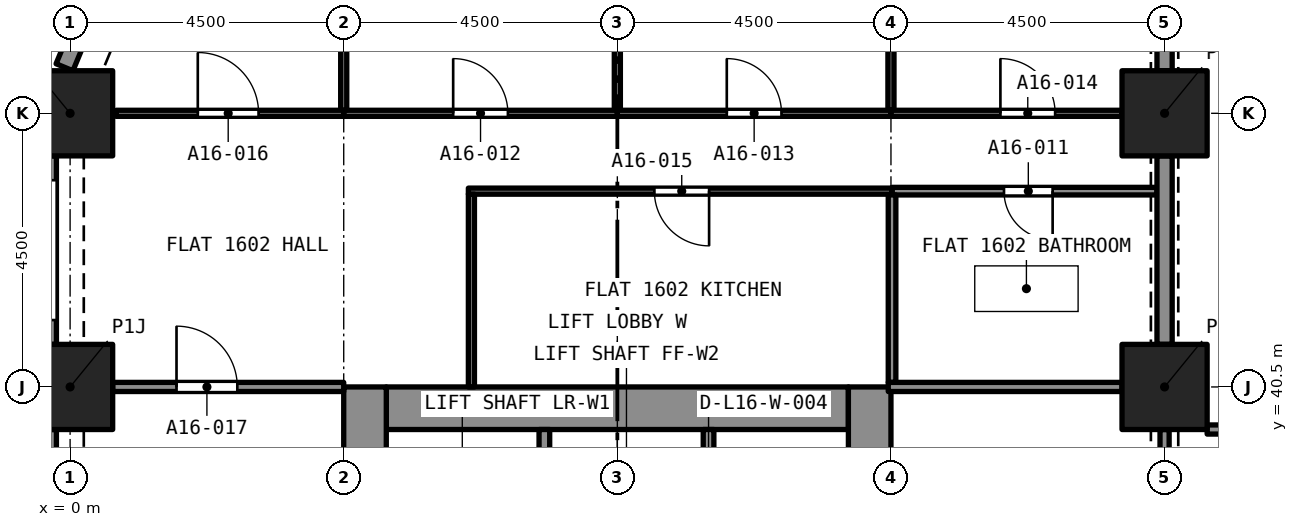
"""IFC4 building model, lengths in metres.
Left out: names, types, materials, properties, quantities, classifications, styles, units other than length and angle.
Written with IfcOpenShell. Run it as: python <this file> out.ifc"""

import sys

from ifc_helpers import new_model, si_unit, direction, frame, frame_2d, origin, origin_2d, place, context, subcontext, project, spatial, rectangle, extrude, element, fill, save


model = new_model("IFC4")
c1 = context("Model", 3, precision=1e-05, world=origin(), true_north=direction((0.0, 1.0)))
c2 = subcontext(c1, "Body", "Model", "MODEL_VIEW")
j1 = project(units=[si_unit("LENGTHUNIT", "METRE"), si_unit("PLANEANGLEUNIT", "RADIAN")], contexts=[c1])
p1 = place(None, origin())
s1 = spatial("IfcSite", under=j1, at=p1, CompositionType="ELEMENT")
p2 = place(p1, origin())
s2 = spatial("IfcBuilding", under=s1, at=p2, CompositionType="ELEMENT")
p3 = place(p2, frame((0.0, 0.0, 62.4)))
s3 = spatial("IfcBuildingStorey", under=s2, at=p3, CompositionType="ELEMENT", Elevation=62.4)
for number, where, z_axis, x_axis in (
    (1, (0.0, 40.5, 0.0), (0.0, 0.0, 1.0), (1.0, 0.0, 0.0)),
    (2, (18.0, 40.5, 0.0), (0.0, 0.0, 1.0), (1.0, 0.0, 0.0)),
    (3, (0.0, 45.0, 0.0), (0.0, 0.0, 1.0), (1.0, 0.0, 0.0)),
    (4, (18.0, 45.0, 0.0), (0.0, 0.0, 1.0), (1.0, 0.0, 0.0)),
):
    element("IfcColumn", number, at=place(p3, frame(where, z_axis=z_axis, x_axis=x_axis)), inside=s3, PredefinedType="COLUMN", context=c2, shape_type="SweptSolid", body=[
        extrude(rectangle(XDim=1.4, YDim=1.4, at=origin_2d()), origin(), (0.0, 0.0, 1.0), 3.2),
    ])
p4 = place(p3, frame((5.2, 40.15, 0.0), z_axis=(0.0, 0.0, 1.0), x_axis=(1.0, 0.0, 0.0)))
e5 = element("IfcWall", 5, at=p4, inside=s3, PredefinedType="SOLIDWALL", context=c2, shape_type="SweptSolid", body=[
    extrude(rectangle(XDim=7.6, YDim=0.7, at=frame_2d((3.8, 0.0))), origin(), (0.0, 0.0, 1.0), 3.2),
])
p5 = place(p3, frame((4.85, 27.0, 0.0), z_axis=(0.0, 0.0, 1.0), x_axis=(0.0, 1.0, 0.0)))
e6 = element("IfcWall", 6, at=p5, inside=s3, PredefinedType="SOLIDWALL", context=c2, shape_type="SweptSolid", body=[
    extrude(rectangle(XDim=13.5, YDim=0.7, at=frame_2d((6.75, 0.0))), origin(), (0.0, 0.0, 1.0), 3.2),
])
p6 = place(p5, frame((8.95, 0.0, 0.0)))
e7 = element("IfcOpeningElement", 7, at=p6, cuts=e6, PredefinedType="OPENING", context=c2, shape_type="SweptSolid", body=[
    extrude(rectangle(XDim=1.2, YDim=2.1, at=frame_2d((0.6, 1.05))), frame((0.0, 0.36, 0.0), z_axis=(0.0, -1.0, 0.0), x_axis=(1.0, 0.0, 0.0)), (0.0, 0.0, 1.0), 0.72),
])
p7 = place(p3, frame((13.15, 27.0, 0.0), z_axis=(0.0, 0.0, 1.0), x_axis=(0.0, 1.0, 0.0)))
e8 = element("IfcWall", 8, at=p7, inside=s3, PredefinedType="SOLIDWALL", context=c2, shape_type="SweptSolid", body=[
    extrude(rectangle(XDim=13.5, YDim=0.7, at=frame_2d((6.75, 0.0))), origin(), (0.0, 0.0, 1.0), 3.2),
])
p8 = place(p7, frame((11.1, 0.0, 0.0)))
e9 = element("IfcOpeningElement", 9, at=p8, cuts=e8, PredefinedType="OPENING", context=c2, shape_type="SweptSolid", body=[
    extrude(rectangle(XDim=1.1, YDim=2.1, at=frame_2d((0.55, 1.05))), frame((0.0, 0.36, 0.0), z_axis=(0.0, -1.0, 0.0), x_axis=(1.0, 0.0, 0.0)), (0.0, 0.0, 1.0), 0.72),
])
p9 = place(p7, frame((8.95, 0.0, 0.0)))
e10 = element("IfcOpeningElement", 10, at=p9, cuts=e8, PredefinedType="OPENING", context=c2, shape_type="SweptSolid", body=[
    extrude(rectangle(XDim=1.2, YDim=2.1, at=frame_2d((0.6, 1.05))), frame((0.0, 0.36, 0.0), z_axis=(0.0, -1.0, 0.0), x_axis=(1.0, 0.0, 0.0)), (0.0, 0.0, 1.0), 0.72),
])
p10 = place(p3, frame((-0.092, 45.757, 0.0), z_axis=(0.0, 0.0, 1.0), x_axis=(0.382737135771, 0.923857286003, 0.0)))
e11 = element("IfcWall", 11, at=p10, inside=s3, PredefinedType="SOLIDWALL", context=c2, shape_type="SweptSolid", body=[
    extrude(rectangle(XDim=1.865, YDim=0.3, at=frame_2d((0.933, 0.0))), origin(), (0.0, 0.0, 1.0), 3.2),
])
p11 = place(p10, frame((0.508, 0.0, 0.45)))
e12 = element("IfcOpeningElement", 12, at=p11, cuts=e11, PredefinedType="OPENING", context=c2, shape_type="SweptSolid", body=[
    extrude(rectangle(XDim=1.1, YDim=1.95, at=frame_2d((0.55, 0.975))), frame((0.0, 0.16, 0.0), z_axis=(0.0, -1.0, 0.0), x_axis=(1.0, 0.0, 0.0)), (0.0, 0.0, 1.0), 0.32),
])
p12 = place(p3, frame((-0.375, 41.2, 0.0), z_axis=(0.0, 0.0, 1.0), x_axis=(0.0, 1.0, 0.0)))
e13 = element("IfcWall", 13, at=p12, inside=s3, PredefinedType="SOLIDWALL", context=c2, shape_type="SweptSolid", body=[
    extrude(rectangle(XDim=3.1, YDim=0.3, at=frame_2d((1.55, 0.0))), origin(), (0.0, 0.0, 1.0), 3.2),
])
p13 = place(p12, frame((0.4, 0.0, 0.45)))
e14 = element("IfcOpeningElement", 14, at=p13, cuts=e13, PredefinedType="OPENING", context=c2, shape_type="SweptSolid", body=[
    extrude(rectangle(XDim=2.3, YDim=1.95, at=frame_2d((1.15, 0.975))), frame((0.0, 0.16, 0.0), z_axis=(0.0, -1.0, 0.0), x_axis=(1.0, 0.0, 0.0)), (0.0, 0.0, 1.0), 0.32),
])
p14 = place(p3, frame((-0.375, 36.7, 0.0), z_axis=(0.0, 0.0, 1.0), x_axis=(0.0, 1.0, 0.0)))
e15 = element("IfcWall", 15, at=p14, inside=s3, PredefinedType="SOLIDWALL", context=c2, shape_type="SweptSolid", body=[
    extrude(rectangle(XDim=3.1, YDim=0.3, at=frame_2d((1.55, 0.0))), origin(), (0.0, 0.0, 1.0), 3.2),
])
p15 = place(p14, frame((0.4, 0.0, 0.45)))
e16 = element("IfcOpeningElement", 16, at=p15, cuts=e15, PredefinedType="OPENING", context=c2, shape_type="SweptSolid", body=[
    extrude(rectangle(XDim=2.3, YDim=1.95, at=frame_2d((1.15, 0.975))), frame((0.0, 0.16, 0.0), z_axis=(0.0, -1.0, 0.0), x_axis=(1.0, 0.0, 0.0)), (0.0, 0.0, 1.0), 0.32),
])
p16 = place(p3, frame((17.875, 43.72, 0.0), z_axis=(0.0, 0.0, 1.0), x_axis=(-1.0, 0.0, 0.0)))
e17 = element("IfcWall", 17, at=p16, inside=s3, PredefinedType="PARTITIONING", context=c2, shape_type="SweptSolid", body=[
    extrude(rectangle(XDim=4.357, YDim=0.125, at=frame_2d((2.178, 0.0))), origin(), (0.0, 0.0, 1.0), 2.9),
])
p17 = place(p16, frame((1.716, 0.0, 0.0)))
e18 = element("IfcOpeningElement", 18, at=p17, cuts=e17, PredefinedType="OPENING", context=c2, shape_type="SweptSolid", body=[
    extrude(rectangle(XDim=0.8, YDim=2.1, at=frame_2d((0.4, 1.05))), frame((0.0, 0.073, 0.0), z_axis=(0.0, -1.0, 0.0), x_axis=(1.0, 0.0, 0.0)), (0.0, 0.0, 1.0), 0.145),
])
p18 = place(p3, frame((13.518, 40.575, 0.0), z_axis=(0.0, 0.0, 1.0), x_axis=(0.0, 1.0, 0.0)))
e19 = element("IfcWall", 19, at=p18, inside=s3, PredefinedType="PARTITIONING", context=c2, shape_type="SweptSolid", body=[
    extrude(rectangle(XDim=3.083, YDim=0.125, at=frame_2d((1.541, 0.0))), origin(), (0.0, 0.0, 1.0), 2.9),
])
p19 = place(p3, frame((18.0, 41.2, 0.0), z_axis=(0.0, 0.0, 1.0), x_axis=(0.0, 1.0, 0.0)))
e20 = element("IfcWall", 20, at=p19, inside=s3, PredefinedType="PARTITIONING", context=c2, shape_type="SweptSolid", body=[
    extrude(rectangle(XDim=3.1, YDim=0.25, at=frame_2d((1.55, 0.0))), origin(), (0.0, 0.0, 1.0), 2.38),
])
p20 = place(p3, frame((13.456, 40.5, 0.0), z_axis=(0.0, 0.0, 1.0), x_axis=(1.0, 0.0, 0.0)))
e21 = element("IfcWall", 21, at=p20, inside=s3, PredefinedType="PARTITIONING", context=c2, shape_type="SweptSolid", body=[
    extrude(rectangle(XDim=3.844, YDim=0.15, at=frame_2d((1.922, 0.0))), origin(), (0.0, 0.0, 1.0), 2.9),
])
p21 = place(p3, frame((9.0, 45.05, 0.0), z_axis=(0.0, 0.0, 1.0), x_axis=(0.0, 1.0, 0.0)))
e22 = element("IfcWall", 22, at=p21, inside=s3, PredefinedType="PARTITIONING", context=c2, shape_type="SweptSolid", body=[
    extrude(rectangle(XDim=3.75, YDim=0.1, at=frame_2d((1.875, 0.0))), origin(), (0.0, 0.0, 1.0), 2.9),
])
p22 = place(p3, frame((4.5, 45.0, 0.0), z_axis=(0.0, 0.0, 1.0), x_axis=(1.0, 0.0, 0.0)))
e23 = element("IfcWall", 23, at=p22, inside=s3, PredefinedType="PARTITIONING", context=c2, shape_type="SweptSolid", body=[
    extrude(rectangle(XDim=4.5, YDim=0.1, at=frame_2d((2.25, 0.0))), origin(), (0.0, 0.0, 1.0), 2.9),
])
p23 = place(p22, frame((1.8, 0.0, 0.0)))
e24 = element("IfcOpeningElement", 24, at=p23, cuts=e23, PredefinedType="OPENING", context=c2, shape_type="SweptSolid", body=[
    extrude(rectangle(XDim=0.9, YDim=2.1, at=frame_2d((0.45, 1.05))), frame((0.0, 0.06, 0.0), z_axis=(0.0, -1.0, 0.0), x_axis=(1.0, 0.0, 0.0)), (0.0, 0.0, 1.0), 0.12),
])
p24 = place(p3, frame((4.5, 45.05, 0.0), z_axis=(0.0, 0.0, 1.0), x_axis=(0.0, 1.0, 0.0)))
e25 = element("IfcWall", 25, at=p24, inside=s3, PredefinedType="PARTITIONING", context=c2, shape_type="SweptSolid", body=[
    extrude(rectangle(XDim=3.692, YDim=0.1, at=frame_2d((1.846, 0.0))), origin(), (0.0, 0.0, 1.0), 2.9),
])
p25 = place(p3, frame((13.5, 45.05, 0.0), z_axis=(0.0, 0.0, 1.0), x_axis=(0.0, 1.0, 0.0)))
e26 = element("IfcWall", 26, at=p25, inside=s3, PredefinedType="PARTITIONING", context=c2, shape_type="SweptSolid", body=[
    extrude(rectangle(XDim=3.75, YDim=0.1, at=frame_2d((1.875, 0.0))), origin(), (0.0, 0.0, 1.0), 2.9),
])
p26 = place(p3, frame((9.0, 45.0, 0.0), z_axis=(0.0, 0.0, 1.0), x_axis=(1.0, 0.0, 0.0)))
e27 = element("IfcWall", 27, at=p26, inside=s3, PredefinedType="PARTITIONING", context=c2, shape_type="SweptSolid", body=[
    extrude(rectangle(XDim=4.5, YDim=0.1, at=frame_2d((2.25, 0.0))), origin(), (0.0, 0.0, 1.0), 2.9),
])
p27 = place(p26, frame((1.8, 0.0, 0.0)))
e28 = element("IfcOpeningElement", 28, at=p27, cuts=e27, PredefinedType="OPENING", context=c2, shape_type="SweptSolid", body=[
    extrude(rectangle(XDim=0.9, YDim=2.1, at=frame_2d((0.45, 1.05))), frame((0.0, 0.06, 0.0), z_axis=(0.0, -1.0, 0.0), x_axis=(1.0, 0.0, 0.0)), (0.0, 0.0, 1.0), 0.12),
])
p28 = place(p3, frame((13.5, 45.0, 0.0), z_axis=(0.0, 0.0, 1.0), x_axis=(1.0, 0.0, 0.0)))
e29 = element("IfcWall", 29, at=p28, inside=s3, PredefinedType="PARTITIONING", context=c2, shape_type="SweptSolid", body=[
    extrude(rectangle(XDim=3.8, YDim=0.1, at=frame_2d((1.9, 0.0))), origin(), (0.0, 0.0, 1.0), 2.9),
])
p29 = place(p28, frame((1.8, 0.0, 0.0)))
e30 = element("IfcOpeningElement", 30, at=p29, cuts=e29, PredefinedType="OPENING", context=c2, shape_type="SweptSolid", body=[
    extrude(rectangle(XDim=0.9, YDim=2.1, at=frame_2d((0.45, 1.05))), frame((0.0, 0.06, 0.0), z_axis=(0.0, -1.0, 0.0), x_axis=(1.0, 0.0, 0.0)), (0.0, 0.0, 1.0), 0.12),
])
p30 = place(p3, frame((18.0, 45.7, 0.0), z_axis=(0.0, 0.0, 1.0), x_axis=(0.0, 1.0, 0.0)))
e31 = element("IfcWall", 31, at=p30, inside=s3, PredefinedType="PARTITIONING", context=c2, shape_type="SweptSolid", body=[
    extrude(rectangle(XDim=3.1, YDim=0.25, at=frame_2d((1.55, 0.0))), origin(), (0.0, 0.0, 1.0), 2.38),
])
p31 = place(p3, frame((13.518, 43.72, 0.0), z_axis=(0.0, 0.0, 1.0), x_axis=(-1.0, 0.0, 0.0)))
e32 = element("IfcWall", 32, at=p31, inside=s3, PredefinedType="PARTITIONING", context=c2, shape_type="SweptSolid", body=[
    extrude(rectangle(XDim=6.968, YDim=0.1, at=frame_2d((3.484, 0.0))), origin(), (0.0, 0.0, 1.0), 2.9),
])
p32 = place(p31, frame((3.009, 0.0, 0.0)))
e33 = element("IfcOpeningElement", 33, at=p32, cuts=e32, PredefinedType="OPENING", context=c2, shape_type="SweptSolid", body=[
    extrude(rectangle(XDim=0.9, YDim=2.1, at=frame_2d((0.45, 1.05))), frame((0.0, 0.06, 0.0), z_axis=(0.0, -1.0, 0.0), x_axis=(1.0, 0.0, 0.0)), (0.0, 0.0, 1.0), 0.12),
])
p33 = place(p3, frame((6.6, 40.5, 0.0), z_axis=(0.0, 0.0, 1.0), x_axis=(0.0, 1.0, 0.0)))
e34 = element("IfcWall", 34, at=p33, inside=s3, PredefinedType="PARTITIONING", context=c2, shape_type="SweptSolid", body=[
    extrude(rectangle(XDim=3.17, YDim=0.1, at=frame_2d((1.585, 0.0))), origin(), (0.0, 0.0, 1.0), 2.9),
])
p34 = place(p3, frame((0.758, 45.0, 0.0), z_axis=(0.0, 0.0, 1.0), x_axis=(1.0, 0.0, 0.0)))
e35 = element("IfcWall", 35, at=p34, inside=s3, PredefinedType="PARTITIONING", context=c2, shape_type="SweptSolid", body=[
    extrude(rectangle(XDim=3.742, YDim=0.1, at=frame_2d((1.871, 0.0))), origin(), (0.0, 0.0, 1.0), 2.9),
])
p35 = place(p34, frame((1.342, 0.0, 0.0)))
e36 = element("IfcOpeningElement", 36, at=p35, cuts=e35, PredefinedType="OPENING", context=c2, shape_type="SweptSolid", body=[
    extrude(rectangle(XDim=1.0, YDim=2.1, at=frame_2d((0.5, 1.05))), frame((0.0, 0.06, 0.0), z_axis=(0.0, -1.0, 0.0), x_axis=(1.0, 0.0, 0.0)), (0.0, 0.0, 1.0), 0.12),
])
p36 = place(p3, frame((0.7, 40.5, 0.0), z_axis=(0.0, 0.0, 1.0), x_axis=(1.0, 0.0, 0.0)))
e37 = element("IfcWall", 37, at=p36, inside=s3, PredefinedType="PARTITIONING", context=c2, shape_type="SweptSolid", body=[
    extrude(rectangle(XDim=3.8, YDim=0.15, at=frame_2d((1.9, 0.0))), origin(), (0.0, 0.0, 1.0), 2.9),
])
p37 = place(p36, frame((1.05, 0.0, 0.0)))
e38 = element("IfcOpeningElement", 38, at=p37, cuts=e37, PredefinedType="OPENING", context=c2, shape_type="SweptSolid", body=[
    extrude(rectangle(XDim=1.0, YDim=2.1, at=frame_2d((0.5, 1.05))), frame((0.0, 0.085, 0.0), z_axis=(0.0, -1.0, 0.0), x_axis=(1.0, 0.0, 0.0)), (0.0, 0.0, 1.0), 0.17),
])
p38 = place(p3, frame((18.7, 39.8, 0.0), z_axis=(0.0, 0.0, 1.0), x_axis=(1.0, 0.0, 0.0)))
e39 = element("IfcWall", 39, at=p38, inside=s3, PredefinedType="PARTITIONING", context=c2, shape_type="SweptSolid", body=[
    extrude(rectangle(XDim=8.3, YDim=0.15, at=frame_2d((4.15, 0.0))), origin(), (0.0, 0.0, 1.0), 2.75),
])
p39 = place(p38, frame((3.3, 0.0, 0.0)))
e40 = element("IfcOpeningElement", 40, at=p39, cuts=e39, PredefinedType="OPENING", context=c2, shape_type="SweptSolid", body=[
    extrude(rectangle(XDim=1.0, YDim=2.1, at=frame_2d((0.5, 1.05))), frame((0.0, 0.085, 0.0), z_axis=(0.0, -1.0, 0.0), x_axis=(1.0, 0.0, 0.0)), (0.0, 0.0, 1.0), 0.17),
])
p40 = place(p3, frame((18.0, 39.8, 0.0), z_axis=(0.0, 0.0, 1.0), x_axis=(0.0, -1.0, 0.0)))
e41 = element("IfcWall", 41, at=p40, inside=s3, PredefinedType="PARTITIONING", context=c2, shape_type="SweptSolid", body=[
    extrude(rectangle(XDim=3.1, YDim=0.15, at=frame_2d((1.55, 0.0))), origin(), (0.0, 0.0, 1.0), 2.38),
])
p41 = place(p40, frame((0.95, 0.0, 0.0)))
e42 = element("IfcOpeningElement", 42, at=p41, cuts=e41, PredefinedType="OPENING", context=c2, shape_type="SweptSolid", body=[
    extrude(rectangle(XDim=1.2, YDim=2.1, at=frame_2d((0.6, 1.05))), frame((0.0, 0.085, 0.0), z_axis=(0.0, -1.0, 0.0), x_axis=(1.0, 0.0, 0.0)), (0.0, 0.0, 1.0), 0.17),
])
p42 = place(p3, frame((7.8, 37.5, 0.0), z_axis=(0.0, 0.0, 1.0), x_axis=(0.0, 1.0, 0.0)))
e43 = element("IfcWall", 43, at=p42, inside=s3, PredefinedType="SOLIDWALL", context=c2, shape_type="SweptSolid", body=[
    extrude(rectangle(XDim=2.3, YDim=0.175, at=frame_2d((1.15, 0.0))), origin(), (0.0, 0.0, 1.0), 2.9),
])
p43 = place(p3, frame((10.5, 37.5, 0.0), z_axis=(0.0, 0.0, 1.0), x_axis=(0.0, 1.0, 0.0)))
e44 = element("IfcWall", 44, at=p43, inside=s3, PredefinedType="SOLIDWALL", context=c2, shape_type="SweptSolid", body=[
    extrude(rectangle(XDim=2.3, YDim=0.175, at=frame_2d((1.15, 0.0))), origin(), (0.0, 0.0, 1.0), 2.9),
])
p44 = place(p43, frame((0.65, 0.0, 0.0)))
e45 = element("IfcOpeningElement", 45, at=p44, cuts=e44, PredefinedType="OPENING", context=c2, shape_type="SweptSolid", body=[
    extrude(rectangle(XDim=1.0, YDim=2.1, at=frame_2d((0.5, 1.05))), frame((0.0, 0.097, 0.0), z_axis=(0.0, -1.0, 0.0), x_axis=(1.0, 0.0, 0.0)), (0.0, 0.0, 1.0), 0.195),
])
p45 = place(p17, origin())
e46 = element("IfcDoor", 46, at=p45, inside=s3, OperationType="SINGLE_SWING_LEFT", PredefinedType="DOOR", context=c2, shape_type="SweptSolid", body=[
    extrude(rectangle(XDim=0.8, YDim=2.1, at=frame_2d((0.4, 1.05))), frame((0.0, 0.025, 0.0), z_axis=(0.0, -1.0, 0.0), x_axis=(1.0, 0.0, 0.0)), (0.0, 0.0, 1.0), 0.05),
])
fill(e18, e46)
p46 = place(p23, origin())
e47 = element("IfcDoor", 47, at=p46, inside=s3, OperationType="SINGLE_SWING_RIGHT", PredefinedType="DOOR", context=c2, shape_type="SweptSolid", body=[
    extrude(rectangle(XDim=0.9, YDim=2.1, at=frame_2d((0.45, 1.05))), frame((0.0, 0.025, 0.0), z_axis=(0.0, -1.0, 0.0), x_axis=(1.0, 0.0, 0.0)), (0.0, 0.0, 1.0), 0.05),
])
fill(e24, e47)
p47 = place(p27, origin())
e48 = element("IfcDoor", 48, at=p47, inside=s3, OperationType="SINGLE_SWING_LEFT", PredefinedType="DOOR", context=c2, shape_type="SweptSolid", body=[
    extrude(rectangle(XDim=0.9, YDim=2.1, at=frame_2d((0.45, 1.05))), frame((0.0, 0.025, 0.0), z_axis=(0.0, -1.0, 0.0), x_axis=(1.0, 0.0, 0.0)), (0.0, 0.0, 1.0), 0.05),
])
fill(e28, e48)
p48 = place(p29, origin())
e49 = element("IfcDoor", 49, at=p48, inside=s3, OperationType="SINGLE_SWING_RIGHT", PredefinedType="DOOR", context=c2, shape_type="SweptSolid", body=[
    extrude(rectangle(XDim=0.9, YDim=2.1, at=frame_2d((0.45, 1.05))), frame((0.0, 0.025, 0.0), z_axis=(0.0, -1.0, 0.0), x_axis=(1.0, 0.0, 0.0)), (0.0, 0.0, 1.0), 0.05),
])
fill(e30, e49)
p49 = place(p32, origin())
e50 = element("IfcDoor", 50, at=p49, inside=s3, OperationType="SINGLE_SWING_LEFT", PredefinedType="DOOR", context=c2, shape_type="SweptSolid", body=[
    extrude(rectangle(XDim=0.9, YDim=2.1, at=frame_2d((0.45, 1.05))), frame((0.0, 0.025, 0.0), z_axis=(0.0, -1.0, 0.0), x_axis=(1.0, 0.0, 0.0)), (0.0, 0.0, 1.0), 0.05),
])
fill(e33, e50)
p50 = place(p35, origin())
e51 = element("IfcDoor", 51, at=p50, inside=s3, OperationType="SINGLE_SWING_LEFT", PredefinedType="DOOR", context=c2, shape_type="SweptSolid", body=[
    extrude(rectangle(XDim=1.0, YDim=2.1, at=frame_2d((0.5, 1.05))), frame((0.0, 0.025, 0.0), z_axis=(0.0, -1.0, 0.0), x_axis=(1.0, 0.0, 0.0)), (0.0, 0.0, 1.0), 0.05),
])
fill(e36, e51)
p51 = place(p37, origin())
e52 = element("IfcDoor", 52, at=p51, inside=s3, OperationType="SINGLE_SWING_LEFT", PredefinedType="DOOR", context=c2, shape_type="SweptSolid", body=[
    extrude(rectangle(XDim=1.0, YDim=2.1, at=frame_2d((0.5, 1.05))), frame((0.0, 0.025, 0.0), z_axis=(0.0, -1.0, 0.0), x_axis=(1.0, 0.0, 0.0)), (0.0, 0.0, 1.0), 0.05),
])
fill(e38, e52)
save(model, sys.argv[1])
